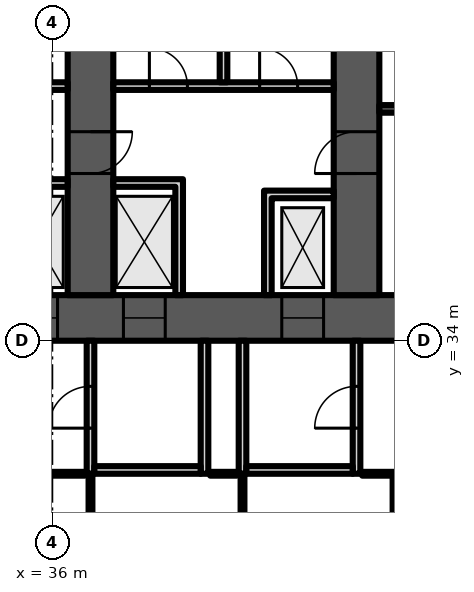
"""IFC4 building model, lengths in metres.
Left out: names, types, materials, properties, quantities, classifications, styles, units other than length and angle.
Written with IfcOpenShell. Run it as: python <this file> out.ifc"""

import sys

from ifc_helpers import new_model, si_unit, direction, frame, frame_2d, origin, place, context, subcontext, project, spatial, polyline, rectangle, outline, extrude, element, fill, save


model = new_model("IFC4")
c1 = context("Model", 3, precision=1e-05, world=origin(), true_north=direction((0.0, 1.0)))
c2 = subcontext(c1, "Body", "Model", "MODEL_VIEW")
j1 = project(units=[si_unit("LENGTHUNIT", "METRE"), si_unit("PLANEANGLEUNIT", "RADIAN")], contexts=[c1])
p1 = place(None, origin())
s1 = spatial("IfcSite", under=j1, at=p1, CompositionType="ELEMENT")
p2 = place(p1, origin())
s2 = spatial("IfcBuilding", under=s1, at=p2, CompositionType="ELEMENT")
p3 = place(p2, frame((0.0, 0.0, 59.5)))
s3 = spatial("IfcBuildingStorey", under=s2, at=p3, CompositionType="ELEMENT", Elevation=59.5)
p4 = place(p3, frame((9.0, 34.6, 0.0), z_axis=(0.0, 0.0, 1.0), x_axis=(1.0, 0.0, 0.0)))
e1 = element("IfcWall", 1, at=p4, inside=s3, PredefinedType="SHEAR", context=c2, shape_type="SweptSolid", body=[
    extrude(rectangle(XDim=56.0, YDim=1.2, at=frame_2d((28.0, 0.0))), origin(), (0.0, 0.0, 1.0), 3.6),
])
p5 = place(p4, frame((2.0, 0.0, 0.0)))
e2 = element("IfcOpeningElement", 2, at=p5, cuts=e1, PredefinedType="OPENING", context=c2, shape_type="SweptSolid", body=[
    extrude(rectangle(XDim=1.0, YDim=2.1, at=frame_2d((0.5, 1.05))), frame((0.0, 0.61, 0.0), z_axis=(0.0, -1.0, 0.0), x_axis=(1.0, 0.0, 0.0)), (0.0, 0.0, 1.0), 1.22),
])
p6 = place(p4, frame((4.6, 0.0, 0.0)))
e3 = element("IfcOpeningElement", 3, at=p6, cuts=e1, PredefinedType="OPENING", context=c2, shape_type="SweptSolid", body=[
    extrude(rectangle(XDim=1.0, YDim=2.1, at=frame_2d((0.5, 1.05))), frame((0.0, 0.61, 0.0), z_axis=(0.0, -1.0, 0.0), x_axis=(1.0, 0.0, 0.0)), (0.0, 0.0, 1.0), 1.22),
])
p7 = place(p4, frame((7.867, 0.0, 0.0)))
e4 = element("IfcOpeningElement", 4, at=p7, cuts=e1, PredefinedType="OPENING", context=c2, shape_type="SweptSolid", body=[
    extrude(rectangle(XDim=1.1, YDim=2.1, at=frame_2d((0.55, 1.05))), frame((0.0, 0.61, 0.0), z_axis=(0.0, -1.0, 0.0), x_axis=(1.0, 0.0, 0.0)), (0.0, 0.0, 1.0), 1.22),
])
p8 = place(p4, frame((12.033, 0.0, 0.0)))
e5 = element("IfcOpeningElement", 5, at=p8, cuts=e1, PredefinedType="OPENING", context=c2, shape_type="SweptSolid", body=[
    extrude(rectangle(XDim=1.1, YDim=2.1, at=frame_2d((0.55, 1.05))), frame((0.0, 0.61, 0.0), z_axis=(0.0, -1.0, 0.0), x_axis=(1.0, 0.0, 0.0)), (0.0, 0.0, 1.0), 1.22),
])
p9 = place(p4, frame((9.8, 0.0, 0.0)))
e6 = element("IfcOpeningElement", 6, at=p9, cuts=e1, PredefinedType="OPENING", context=c2, shape_type="SweptSolid", body=[
    extrude(rectangle(XDim=1.4, YDim=2.1, at=frame_2d((0.7, 1.05))), frame((0.0, 0.61, 0.0), z_axis=(0.0, -1.0, 0.0), x_axis=(1.0, 0.0, 0.0)), (0.0, 0.0, 1.0), 1.22),
])
p10 = place(p4, frame((14.65, 0.0, 0.0)))
e7 = element("IfcOpeningElement", 7, at=p10, cuts=e1, PredefinedType="OPENING", context=c2, shape_type="SweptSolid", body=[
    extrude(rectangle(XDim=1.2, YDim=2.1, at=frame_2d((0.6, 1.05))), frame((0.0, 0.61, 0.0), z_axis=(0.0, -1.0, 0.0), x_axis=(1.0, 0.0, 0.0)), (0.0, 0.0, 1.0), 1.22),
])
p11 = place(p4, frame((21.867, 0.0, 0.0)))
e8 = element("IfcOpeningElement", 8, at=p11, cuts=e1, PredefinedType="OPENING", context=c2, shape_type="SweptSolid", body=[
    extrude(rectangle(XDim=1.1, YDim=2.1, at=frame_2d((0.55, 1.05))), frame((0.0, 0.61, 0.0), z_axis=(0.0, -1.0, 0.0), x_axis=(1.0, 0.0, 0.0)), (0.0, 0.0, 1.0), 1.22),
])
p12 = place(p4, frame((26.033, 0.0, 0.0)))
e9 = element("IfcOpeningElement", 9, at=p12, cuts=e1, PredefinedType="OPENING", context=c2, shape_type="SweptSolid", body=[
    extrude(rectangle(XDim=1.1, YDim=2.1, at=frame_2d((0.55, 1.05))), frame((0.0, 0.61, 0.0), z_axis=(0.0, -1.0, 0.0), x_axis=(1.0, 0.0, 0.0)), (0.0, 0.0, 1.0), 1.22),
])
p13 = place(p4, frame((23.8, 0.0, 0.0)))
e10 = element("IfcOpeningElement", 10, at=p13, cuts=e1, PredefinedType="OPENING", context=c2, shape_type="SweptSolid", body=[
    extrude(rectangle(XDim=1.4, YDim=2.1, at=frame_2d((0.7, 1.05))), frame((0.0, 0.61, 0.0), z_axis=(0.0, -1.0, 0.0), x_axis=(1.0, 0.0, 0.0)), (0.0, 0.0, 1.0), 1.22),
])
p14 = place(p4, frame((28.867, 0.0, 0.0)))
e11 = element("IfcOpeningElement", 11, at=p14, cuts=e1, PredefinedType="OPENING", context=c2, shape_type="SweptSolid", body=[
    extrude(rectangle(XDim=1.1, YDim=2.1, at=frame_2d((0.55, 1.05))), frame((0.0, 0.61, 0.0), z_axis=(0.0, -1.0, 0.0), x_axis=(1.0, 0.0, 0.0)), (0.0, 0.0, 1.0), 1.22),
])
p15 = place(p4, frame((33.033, 0.0, 0.0)))
e12 = element("IfcOpeningElement", 12, at=p15, cuts=e1, PredefinedType="OPENING", context=c2, shape_type="SweptSolid", body=[
    extrude(rectangle(XDim=1.1, YDim=2.1, at=frame_2d((0.55, 1.05))), frame((0.0, 0.61, 0.0), z_axis=(0.0, -1.0, 0.0), x_axis=(1.0, 0.0, 0.0)), (0.0, 0.0, 1.0), 1.22),
])
p16 = place(p4, frame((40.15, 0.0, 0.0)))
e13 = element("IfcOpeningElement", 13, at=p16, cuts=e1, PredefinedType="OPENING", context=c2, shape_type="SweptSolid", body=[
    extrude(rectangle(XDim=1.2, YDim=2.1, at=frame_2d((0.6, 1.05))), frame((0.0, 0.61, 0.0), z_axis=(0.0, -1.0, 0.0), x_axis=(1.0, 0.0, 0.0)), (0.0, 0.0, 1.0), 1.22),
])
p17 = place(p4, frame((44.8, 0.0, 0.0)))
e14 = element("IfcOpeningElement", 14, at=p17, cuts=e1, PredefinedType="OPENING", context=c2, shape_type="SweptSolid", body=[
    extrude(rectangle(XDim=1.4, YDim=2.1, at=frame_2d((0.7, 1.05))), frame((0.0, 0.61, 0.0), z_axis=(0.0, -1.0, 0.0), x_axis=(1.0, 0.0, 0.0)), (0.0, 0.0, 1.0), 1.22),
])
p18 = place(p4, frame((49.867, 0.0, 0.0)))
e15 = element("IfcOpeningElement", 15, at=p18, cuts=e1, PredefinedType="OPENING", context=c2, shape_type="SweptSolid", body=[
    extrude(rectangle(XDim=1.1, YDim=2.1, at=frame_2d((0.55, 1.05))), frame((0.0, 0.61, 0.0), z_axis=(0.0, -1.0, 0.0), x_axis=(1.0, 0.0, 0.0)), (0.0, 0.0, 1.0), 1.22),
])
p19 = place(p4, frame((53.5, 0.0, 0.0)))
e16 = element("IfcOpeningElement", 16, at=p19, cuts=e1, PredefinedType="OPENING", context=c2, shape_type="SweptSolid", body=[
    extrude(rectangle(XDim=1.1, YDim=2.1, at=frame_2d((0.55, 1.05))), frame((0.0, 0.61, 0.0), z_axis=(0.0, -1.0, 0.0), x_axis=(1.0, 0.0, 0.0)), (0.0, 0.0, 1.0), 1.22),
])
p20 = place(p4, frame((51.567, 0.0, 0.0)))
e17 = element("IfcOpeningElement", 17, at=p20, cuts=e1, PredefinedType="OPENING", context=c2, shape_type="SweptSolid", body=[
    extrude(rectangle(XDim=1.4, YDim=2.1, at=frame_2d((0.7, 1.05))), frame((0.0, 0.61, 0.0), z_axis=(0.0, -1.0, 0.0), x_axis=(1.0, 0.0, 0.0)), (0.0, 0.0, 1.0), 1.22),
])
p21 = place(p3, frame((37.0, 35.2, 0.0), z_axis=(0.0, 0.0, 1.0), x_axis=(0.0, 1.0, 0.0)))
e18 = element("IfcWall", 18, at=p21, inside=s3, PredefinedType="SHEAR", context=c2, shape_type="SweptSolid", body=[
    extrude(rectangle(XDim=14.78, YDim=1.2, at=frame_2d((7.39, 0.0))), origin(), (0.0, 0.0, 1.0), 3.6),
])
p22 = place(p21, frame((3.2, 0.0, 0.0)))
e19 = element("IfcOpeningElement", 19, at=p22, cuts=e18, PredefinedType="OPENING", context=c2, shape_type="SweptSolid", body=[
    extrude(rectangle(XDim=1.1, YDim=2.1, at=frame_2d((0.55, 1.05))), frame((0.0, 0.61, 0.0), z_axis=(0.0, -1.0, 0.0), x_axis=(1.0, 0.0, 0.0)), (0.0, 0.0, 1.0), 1.22),
])
p23 = place(p21, frame((9.6, 0.0, 0.0)))
e20 = element("IfcOpeningElement", 20, at=p23, cuts=e18, PredefinedType="OPENING", context=c2, shape_type="SweptSolid", body=[
    extrude(rectangle(XDim=1.0, YDim=2.1, at=frame_2d((0.5, 1.05))), frame((0.0, 0.61, 0.0), z_axis=(0.0, -1.0, 0.0), x_axis=(1.0, 0.0, 0.0)), (0.0, 0.0, 1.0), 1.22),
])
p24 = place(p3, frame((44.0, 35.2, 0.0), z_axis=(0.0, 0.0, 1.0), x_axis=(0.0, 1.0, 0.0)))
e21 = element("IfcWall", 21, at=p24, inside=s3, PredefinedType="SHEAR", context=c2, shape_type="SweptSolid", body=[
    extrude(rectangle(XDim=14.168, YDim=1.2, at=frame_2d((7.084, 0.0))), origin(), (0.0, 0.0, 1.0), 3.6),
])
p25 = place(p24, frame((3.2, 0.0, 0.0)))
e22 = element("IfcOpeningElement", 22, at=p25, cuts=e21, PredefinedType="OPENING", context=c2, shape_type="SweptSolid", body=[
    extrude(rectangle(XDim=1.1, YDim=2.1, at=frame_2d((0.55, 1.05))), frame((0.0, 0.61, 0.0), z_axis=(0.0, -1.0, 0.0), x_axis=(1.0, 0.0, 0.0)), (0.0, 0.0, 1.0), 1.22),
])
p26 = place(p24, frame((9.6, 0.0, 0.0)))
e23 = element("IfcOpeningElement", 23, at=p26, cuts=e21, PredefinedType="OPENING", context=c2, shape_type="SweptSolid", body=[
    extrude(rectangle(XDim=1.0, YDim=2.1, at=frame_2d((0.5, 1.05))), frame((0.0, 0.61, 0.0), z_axis=(0.0, -1.0, 0.0), x_axis=(1.0, 0.0, 0.0)), (0.0, 0.0, 1.0), 1.22),
])
p27 = place(p3, frame((30.6, 40.7, 0.0), z_axis=(0.0, 0.0, 1.0), x_axis=(1.0, 0.0, 0.0)))
e24 = element("IfcWall", 24, at=p27, inside=s3, PredefinedType="PARTITIONING", context=c2, shape_type="SweptSolid", body=[
    extrude(rectangle(XDim=5.8, YDim=0.2, at=frame_2d((2.9, 0.0))), origin(), (0.0, 0.0, 1.0), 3.2),
])
p28 = place(p27, frame((0.95, 0.0, 0.0)))
e25 = element("IfcOpeningElement", 25, at=p28, cuts=e24, PredefinedType="OPENING", context=c2, shape_type="SweptSolid", body=[
    extrude(rectangle(XDim=1.0, YDim=2.1, at=frame_2d((0.5, 1.05))), frame((0.0, 0.11, 0.0), z_axis=(0.0, -1.0, 0.0), x_axis=(1.0, 0.0, 0.0)), (0.0, 0.0, 1.0), 0.22),
])
p29 = place(p27, frame((3.85, 0.0, 0.0)))
e26 = element("IfcOpeningElement", 26, at=p29, cuts=e24, PredefinedType="OPENING", context=c2, shape_type="SweptSolid", body=[
    extrude(rectangle(XDim=1.0, YDim=2.1, at=frame_2d((0.5, 1.05))), frame((0.0, 0.11, 0.0), z_axis=(0.0, -1.0, 0.0), x_axis=(1.0, 0.0, 0.0)), (0.0, 0.0, 1.0), 0.22),
])
p30 = place(p3, frame((0.0, 0.0, -0.0)))
e27 = element("IfcWall", 27, at=p30, inside=s3, PredefinedType="PARTITIONING", context=c2, shape_type="SweptSolid", body=[
    extrude(outline(polyline([(34.567, 38.25), (34.767, 38.25), (36.4, 38.25), (36.4, 38.05), (34.767, 38.05), (34.767, 35.2), (34.567, 35.2), (34.567, 38.25)])), origin(), (0.0, 0.0, 1.0), 3.2),
])
p31 = place(p3, frame((37.6, 40.7, 0.0), z_axis=(0.0, 0.0, 1.0), x_axis=(1.0, 0.0, 0.0)))
e28 = element("IfcWall", 28, at=p31, inside=s3, PredefinedType="PARTITIONING", context=c2, shape_type="SweptSolid", body=[
    extrude(rectangle(XDim=5.8, YDim=0.2, at=frame_2d((2.9, 0.0))), origin(), (0.0, 0.0, 1.0), 3.2),
])
p32 = place(p31, frame((0.95, 0.0, 0.0)))
e29 = element("IfcOpeningElement", 29, at=p32, cuts=e28, PredefinedType="OPENING", context=c2, shape_type="SweptSolid", body=[
    extrude(rectangle(XDim=1.0, YDim=2.1, at=frame_2d((0.5, 1.05))), frame((0.0, 0.11, 0.0), z_axis=(0.0, -1.0, 0.0), x_axis=(1.0, 0.0, 0.0)), (0.0, 0.0, 1.0), 0.22),
])
p33 = place(p31, frame((3.85, 0.0, 0.0)))
e30 = element("IfcOpeningElement", 30, at=p33, cuts=e28, PredefinedType="OPENING", context=c2, shape_type="SweptSolid", body=[
    extrude(rectangle(XDim=1.0, YDim=2.1, at=frame_2d((0.5, 1.05))), frame((0.0, 0.11, 0.0), z_axis=(0.0, -1.0, 0.0), x_axis=(1.0, 0.0, 0.0)), (0.0, 0.0, 1.0), 0.22),
])
p34 = place(p3, frame((0.0, 0.0, -0.0)))
e31 = element("IfcWall", 31, at=p34, inside=s3, PredefinedType="PARTITIONING", context=c2, shape_type="SweptSolid", body=[
    extrude(outline(polyline([(41.567, 37.95), (41.767, 37.95), (43.4, 37.95), (43.4, 37.75), (41.767, 37.75), (41.767, 35.2), (41.567, 35.2), (41.567, 37.95)])), origin(), (0.0, 0.0, 1.0), 3.2),
])
p35 = place(p3, frame((0.0, 0.0, -0.0)))
e32 = element("IfcWall", 32, at=p35, inside=s3, PredefinedType="PARTITIONING", context=c2, shape_type="SweptSolid", body=[
    extrude(outline(polyline([(39.233, 38.05), (37.6, 38.05), (37.6, 38.25), (39.233, 38.25), (39.433, 38.25), (39.433, 35.2), (39.233, 35.2), (39.233, 38.05)])), origin(), (0.0, 0.0, 1.0), 3.2),
])
p36 = place(p3, frame((40.5, 40.8, 0.0), z_axis=(0.0, 0.0, 1.0), x_axis=(0.0, 1.0, 0.0)))
e33 = element("IfcWall", 33, at=p36, inside=s3, PredefinedType="PARTITIONING", context=c2, shape_type="SweptSolid", body=[
    extrude(rectangle(XDim=8.653, YDim=0.2, at=frame_2d((4.326, 0.0))), origin(), (0.0, 0.0, 1.0), 3.2),
])
p37 = place(p3, frame((44.6, 40.1, 0.0), z_axis=(0.0, 0.0, 1.0), x_axis=(1.0, 0.0, 0.0)))
e34 = element("IfcWall", 34, at=p37, inside=s3, PredefinedType="SHEAR", context=c2, shape_type="SweptSolid", body=[
    extrude(rectangle(XDim=5.8, YDim=0.2, at=frame_2d((2.9, 0.0))), origin(), (0.0, 0.0, 1.0), 3.2),
])
p38 = place(p37, frame((3.325, 0.0, 0.0)))
e35 = element("IfcOpeningElement", 35, at=p38, cuts=e34, PredefinedType="OPENING", context=c2, shape_type="SweptSolid", body=[
    extrude(rectangle(XDim=1.2, YDim=2.1, at=frame_2d((0.6, 1.05))), frame((0.0, 0.11, 0.0), z_axis=(0.0, -1.0, 0.0), x_axis=(1.0, 0.0, 0.0)), (0.0, 0.0, 1.0), 0.22),
])
p39 = place(p37, frame((0.475, 0.0, 0.0)))
e36 = element("IfcOpeningElement", 36, at=p39, cuts=e34, PredefinedType="OPENING", context=c2, shape_type="SweptSolid", body=[
    extrude(rectangle(XDim=0.9, YDim=2.1, at=frame_2d((0.45, 1.05))), frame((0.0, 0.11, 0.0), z_axis=(0.0, -1.0, 0.0), x_axis=(1.0, 0.0, 0.0)), (0.0, 0.0, 1.0), 0.22),
])
p40 = place(p3, frame((37.0, 30.5, 0.0), z_axis=(0.0, 0.0, 1.0), x_axis=(0.0, 1.0, 0.0)))
e37 = element("IfcWall", 37, at=p40, inside=s3, PredefinedType="PARTITIONING", context=c2, shape_type="SweptSolid", body=[
    extrude(rectangle(XDim=3.5, YDim=0.2, at=frame_2d((1.75, 0.0))), origin(), (0.0, 0.0, 1.0), 3.2),
])
p41 = place(p40, frame((1.2, 0.0, 0.0)))
e38 = element("IfcOpeningElement", 38, at=p41, cuts=e37, PredefinedType="OPENING", context=c2, shape_type="SweptSolid", body=[
    extrude(rectangle(XDim=1.1, YDim=2.1, at=frame_2d((0.55, 1.05))), frame((0.0, 0.11, 0.0), z_axis=(0.0, -1.0, 0.0), x_axis=(1.0, 0.0, 0.0)), (0.0, 0.0, 1.0), 0.22),
])
p42 = place(p3, frame((40.0, 30.5, 0.0), z_axis=(0.0, 0.0, 1.0), x_axis=(0.0, 1.0, 0.0)))
e39 = element("IfcWall", 39, at=p42, inside=s3, PredefinedType="PARTITIONING", context=c2, shape_type="SweptSolid", body=[
    extrude(rectangle(XDim=3.5, YDim=0.2, at=frame_2d((1.75, 0.0))), origin(), (0.0, 0.0, 1.0), 3.2),
])
p43 = place(p3, frame((37.1, 30.6, 0.0), z_axis=(0.0, 0.0, 1.0), x_axis=(1.0, 0.0, 0.0)))
e40 = element("IfcWall", 40, at=p43, inside=s3, PredefinedType="PARTITIONING", context=c2, shape_type="SweptSolid", body=[
    extrude(rectangle(XDim=2.8, YDim=0.2, at=frame_2d((1.4, 0.0))), origin(), (0.0, 0.0, 1.0), 3.2),
])
p44 = place(p3, frame((41.0, 30.5, 0.0), z_axis=(0.0, 0.0, 1.0), x_axis=(0.0, 1.0, 0.0)))
e41 = element("IfcWall", 41, at=p44, inside=s3, PredefinedType="PARTITIONING", context=c2, shape_type="SweptSolid", body=[
    extrude(rectangle(XDim=3.5, YDim=0.2, at=frame_2d((1.75, 0.0))), origin(), (0.0, 0.0, 1.0), 3.2),
])
p45 = place(p3, frame((44.0, 30.5, 0.0), z_axis=(0.0, 0.0, 1.0), x_axis=(0.0, 1.0, 0.0)))
e42 = element("IfcWall", 42, at=p45, inside=s3, PredefinedType="PARTITIONING", context=c2, shape_type="SweptSolid", body=[
    extrude(rectangle(XDim=3.5, YDim=0.2, at=frame_2d((1.75, 0.0))), origin(), (0.0, 0.0, 1.0), 3.2),
])
p46 = place(p45, frame((1.2, 0.0, 0.0)))
e43 = element("IfcOpeningElement", 43, at=p46, cuts=e42, PredefinedType="OPENING", context=c2, shape_type="SweptSolid", body=[
    extrude(rectangle(XDim=1.1, YDim=2.1, at=frame_2d((0.55, 1.05))), frame((0.0, 0.11, 0.0), z_axis=(0.0, -1.0, 0.0), x_axis=(1.0, 0.0, 0.0)), (0.0, 0.0, 1.0), 0.22),
])
p47 = place(p3, frame((41.1, 30.6, 0.0), z_axis=(0.0, 0.0, 1.0), x_axis=(1.0, 0.0, 0.0)))
e44 = element("IfcWall", 44, at=p47, inside=s3, PredefinedType="PARTITIONING", context=c2, shape_type="SweptSolid", body=[
    extrude(rectangle(XDim=2.8, YDim=0.2, at=frame_2d((1.4, 0.0))), origin(), (0.0, 0.0, 1.0), 3.2),
])
p48 = place(p3, frame((11.2, 30.5, 0.0), z_axis=(0.0, 0.0, 1.0), x_axis=(1.0, 0.0, 0.0)))
e45 = element("IfcWall", 45, at=p48, inside=s3, PredefinedType="PARTITIONING", context=c2, shape_type="SweptSolid", body=[
    extrude(rectangle(XDim=25.65, YDim=0.1, at=frame_2d((12.825, 0.0))), origin(), (0.0, 0.0, 1.0), 3.2),
])
p49 = place(p48, frame((0.195, 0.0, 0.0)))
e46 = element("IfcOpeningElement", 46, at=p49, cuts=e45, PredefinedType="OPENING", context=c2, shape_type="SweptSolid", body=[
    extrude(rectangle(XDim=1.0, YDim=2.1, at=frame_2d((0.5, 1.05))), frame((0.0, 0.06, 0.0), z_axis=(0.0, -1.0, 0.0), x_axis=(1.0, 0.0, 0.0)), (0.0, 0.0, 1.0), 0.12),
])
p50 = place(p48, frame((14.755, 0.0, 0.0)))
e47 = element("IfcOpeningElement", 47, at=p50, cuts=e45, PredefinedType="OPENING", context=c2, shape_type="SweptSolid", body=[
    extrude(rectangle(XDim=1.0, YDim=2.1, at=frame_2d((0.5, 1.05))), frame((0.0, 0.06, 0.0), z_axis=(0.0, -1.0, 0.0), x_axis=(1.0, 0.0, 0.0)), (0.0, 0.0, 1.0), 0.12),
])
p51 = place(p48, frame((18.975, 0.0, 0.0)))
e48 = element("IfcOpeningElement", 48, at=p51, cuts=e45, PredefinedType="OPENING", context=c2, shape_type="SweptSolid", body=[
    extrude(rectangle(XDim=1.0, YDim=2.1, at=frame_2d((0.5, 1.05))), frame((0.0, 0.06, 0.0), z_axis=(0.0, -1.0, 0.0), x_axis=(1.0, 0.0, 0.0)), (0.0, 0.0, 1.0), 0.12),
])
for number, where, z_axis, x_axis in (
    (49, (37.0, 20.445, 0.0), (0.0, 0.0, 1.0), (0.0, 1.0, 0.0)),
    (50, (41.0, 20.445, 0.0), (0.0, 0.0, 1.0), (0.0, 1.0, 0.0)),
    (51, (45.0, 20.445, 0.0), (0.0, 0.0, 1.0), (0.0, 1.0, 0.0)),
):
    element("IfcWall", number, at=place(p3, frame(where, z_axis=z_axis, x_axis=x_axis)), inside=s3, PredefinedType="PARTITIONING", context=c2, shape_type="SweptSolid", body=[
        extrude(rectangle(XDim=10.055, YDim=0.1, at=frame_2d((5.027, 0.0))), origin(), (0.0, 0.0, 1.0), 3.2),
    ])
p52 = place(p3, frame((40.15, 30.5, 0.0), z_axis=(0.0, 0.0, 1.0), x_axis=(1.0, 0.0, 0.0)))
e52 = element("IfcWall", 52, at=p52, inside=s3, PredefinedType="PARTITIONING", context=c2, shape_type="SweptSolid", body=[
    extrude(rectangle(XDim=0.7, YDim=0.1, at=frame_2d((0.35, 0.0))), origin(), (0.0, 0.0, 1.0), 3.2),
])
p53 = place(p3, frame((44.15, 30.5, 0.0), z_axis=(0.0, 0.0, 1.0), x_axis=(1.0, 0.0, 0.0)))
e53 = element("IfcWall", 53, at=p53, inside=s3, PredefinedType="PARTITIONING", context=c2, shape_type="SweptSolid", body=[
    extrude(rectangle(XDim=20.85, YDim=0.1, at=frame_2d((10.425, 0.0))), origin(), (0.0, 0.0, 1.0), 3.2),
])
p54 = place(p53, frame((2.27, 0.0, 0.0)))
e54 = element("IfcOpeningElement", 54, at=p54, cuts=e53, PredefinedType="OPENING", context=c2, shape_type="SweptSolid", body=[
    extrude(rectangle(XDim=1.0, YDim=2.1, at=frame_2d((0.5, 1.05))), frame((0.0, 0.06, 0.0), z_axis=(0.0, -1.0, 0.0), x_axis=(1.0, 0.0, 0.0)), (0.0, 0.0, 1.0), 0.12),
])
p55 = place(p12, origin())
e55 = element("IfcDoor", 55, at=p55, inside=s3, OperationType="DOUBLE_DOOR_SLIDING", PredefinedType="DOOR", context=c2, shape_type="SweptSolid", body=[
    extrude(rectangle(XDim=1.1, YDim=2.1, at=frame_2d((0.55, 1.05))), frame((0.0, 0.025, 0.0), z_axis=(0.0, -1.0, 0.0), x_axis=(1.0, 0.0, 0.0)), (0.0, 0.0, 1.0), 0.05),
])
fill(e9, e55)
p56 = place(p14, origin())
e56 = element("IfcDoor", 56, at=p56, inside=s3, OperationType="DOUBLE_DOOR_SLIDING", PredefinedType="DOOR", context=c2, shape_type="SweptSolid", body=[
    extrude(rectangle(XDim=1.1, YDim=2.1, at=frame_2d((0.55, 1.05))), frame((0.0, 0.025, 0.0), z_axis=(0.0, -1.0, 0.0), x_axis=(1.0, 0.0, 0.0)), (0.0, 0.0, 1.0), 0.05),
])
fill(e11, e56)
p57 = place(p15, origin())
e57 = element("IfcDoor", 57, at=p57, inside=s3, OperationType="DOUBLE_DOOR_SLIDING", PredefinedType="DOOR", context=c2, shape_type="SweptSolid", body=[
    extrude(rectangle(XDim=1.1, YDim=2.1, at=frame_2d((0.55, 1.05))), frame((0.0, 0.025, 0.0), z_axis=(0.0, -1.0, 0.0), x_axis=(1.0, 0.0, 0.0)), (0.0, 0.0, 1.0), 0.05),
])
fill(e12, e57)
p58 = place(p32, origin())
e58 = element("IfcDoor", 58, at=p58, inside=s3, OperationType="SINGLE_SWING_LEFT", PredefinedType="DOOR", context=c2, shape_type="SweptSolid", body=[
    extrude(rectangle(XDim=1.0, YDim=2.1, at=frame_2d((0.5, 1.05))), frame((0.0, 0.025, 0.0), z_axis=(0.0, -1.0, 0.0), x_axis=(1.0, 0.0, 0.0)), (0.0, 0.0, 1.0), 0.05),
])
fill(e29, e58)
p59 = place(p33, origin())
e59 = element("IfcDoor", 59, at=p59, inside=s3, OperationType="SINGLE_SWING_LEFT", PredefinedType="DOOR", context=c2, shape_type="SweptSolid", body=[
    extrude(rectangle(XDim=1.0, YDim=2.1, at=frame_2d((0.5, 1.05))), frame((0.0, 0.025, 0.0), z_axis=(0.0, -1.0, 0.0), x_axis=(1.0, 0.0, 0.0)), (0.0, 0.0, 1.0), 0.05),
])
fill(e30, e59)
p60 = place(p22, origin())
e60 = element("IfcDoor", 60, at=p60, inside=s3, OperationType="SINGLE_SWING_RIGHT", PredefinedType="DOOR", context=c2, shape_type="SweptSolid", body=[
    extrude(rectangle(XDim=1.1, YDim=2.1, at=frame_2d((0.55, 1.05))), frame((0.0, 0.025, 0.0), z_axis=(0.0, -1.0, 0.0), x_axis=(1.0, 0.0, 0.0)), (0.0, 0.0, 1.0), 0.05),
])
fill(e19, e60)
p61 = place(p25, origin())
e61 = element("IfcDoor", 61, at=p61, inside=s3, OperationType="SINGLE_SWING_LEFT", PredefinedType="DOOR", context=c2, shape_type="SweptSolid", body=[
    extrude(rectangle(XDim=1.1, YDim=2.1, at=frame_2d((0.55, 1.05))), frame((0.0, 0.025, 0.0), z_axis=(0.0, -1.0, 0.0), x_axis=(1.0, 0.0, 0.0)), (0.0, 0.0, 1.0), 0.05),
])
fill(e22, e61)
p62 = place(p41, origin())
e62 = element("IfcDoor", 62, at=p62, inside=s3, OperationType="SINGLE_SWING_LEFT", PredefinedType="DOOR", context=c2, shape_type="SweptSolid", body=[
    extrude(rectangle(XDim=1.1, YDim=2.1, at=frame_2d((0.55, 1.05))), frame((0.0, 0.025, 0.0), z_axis=(0.0, -1.0, 0.0), x_axis=(1.0, 0.0, 0.0)), (0.0, 0.0, 1.0), 0.05),
])
fill(e38, e62)
p63 = place(p46, origin())
e63 = element("IfcDoor", 63, at=p63, inside=s3, OperationType="SINGLE_SWING_LEFT", PredefinedType="DOOR", context=c2, shape_type="SweptSolid", body=[
    extrude(rectangle(XDim=1.1, YDim=2.1, at=frame_2d((0.55, 1.05))), frame((0.0, 0.025, 0.0), z_axis=(0.0, -1.0, 0.0), x_axis=(1.0, 0.0, 0.0)), (0.0, 0.0, 1.0), 0.05),
])
fill(e43, e63)
save(model, sys.argv[1])
